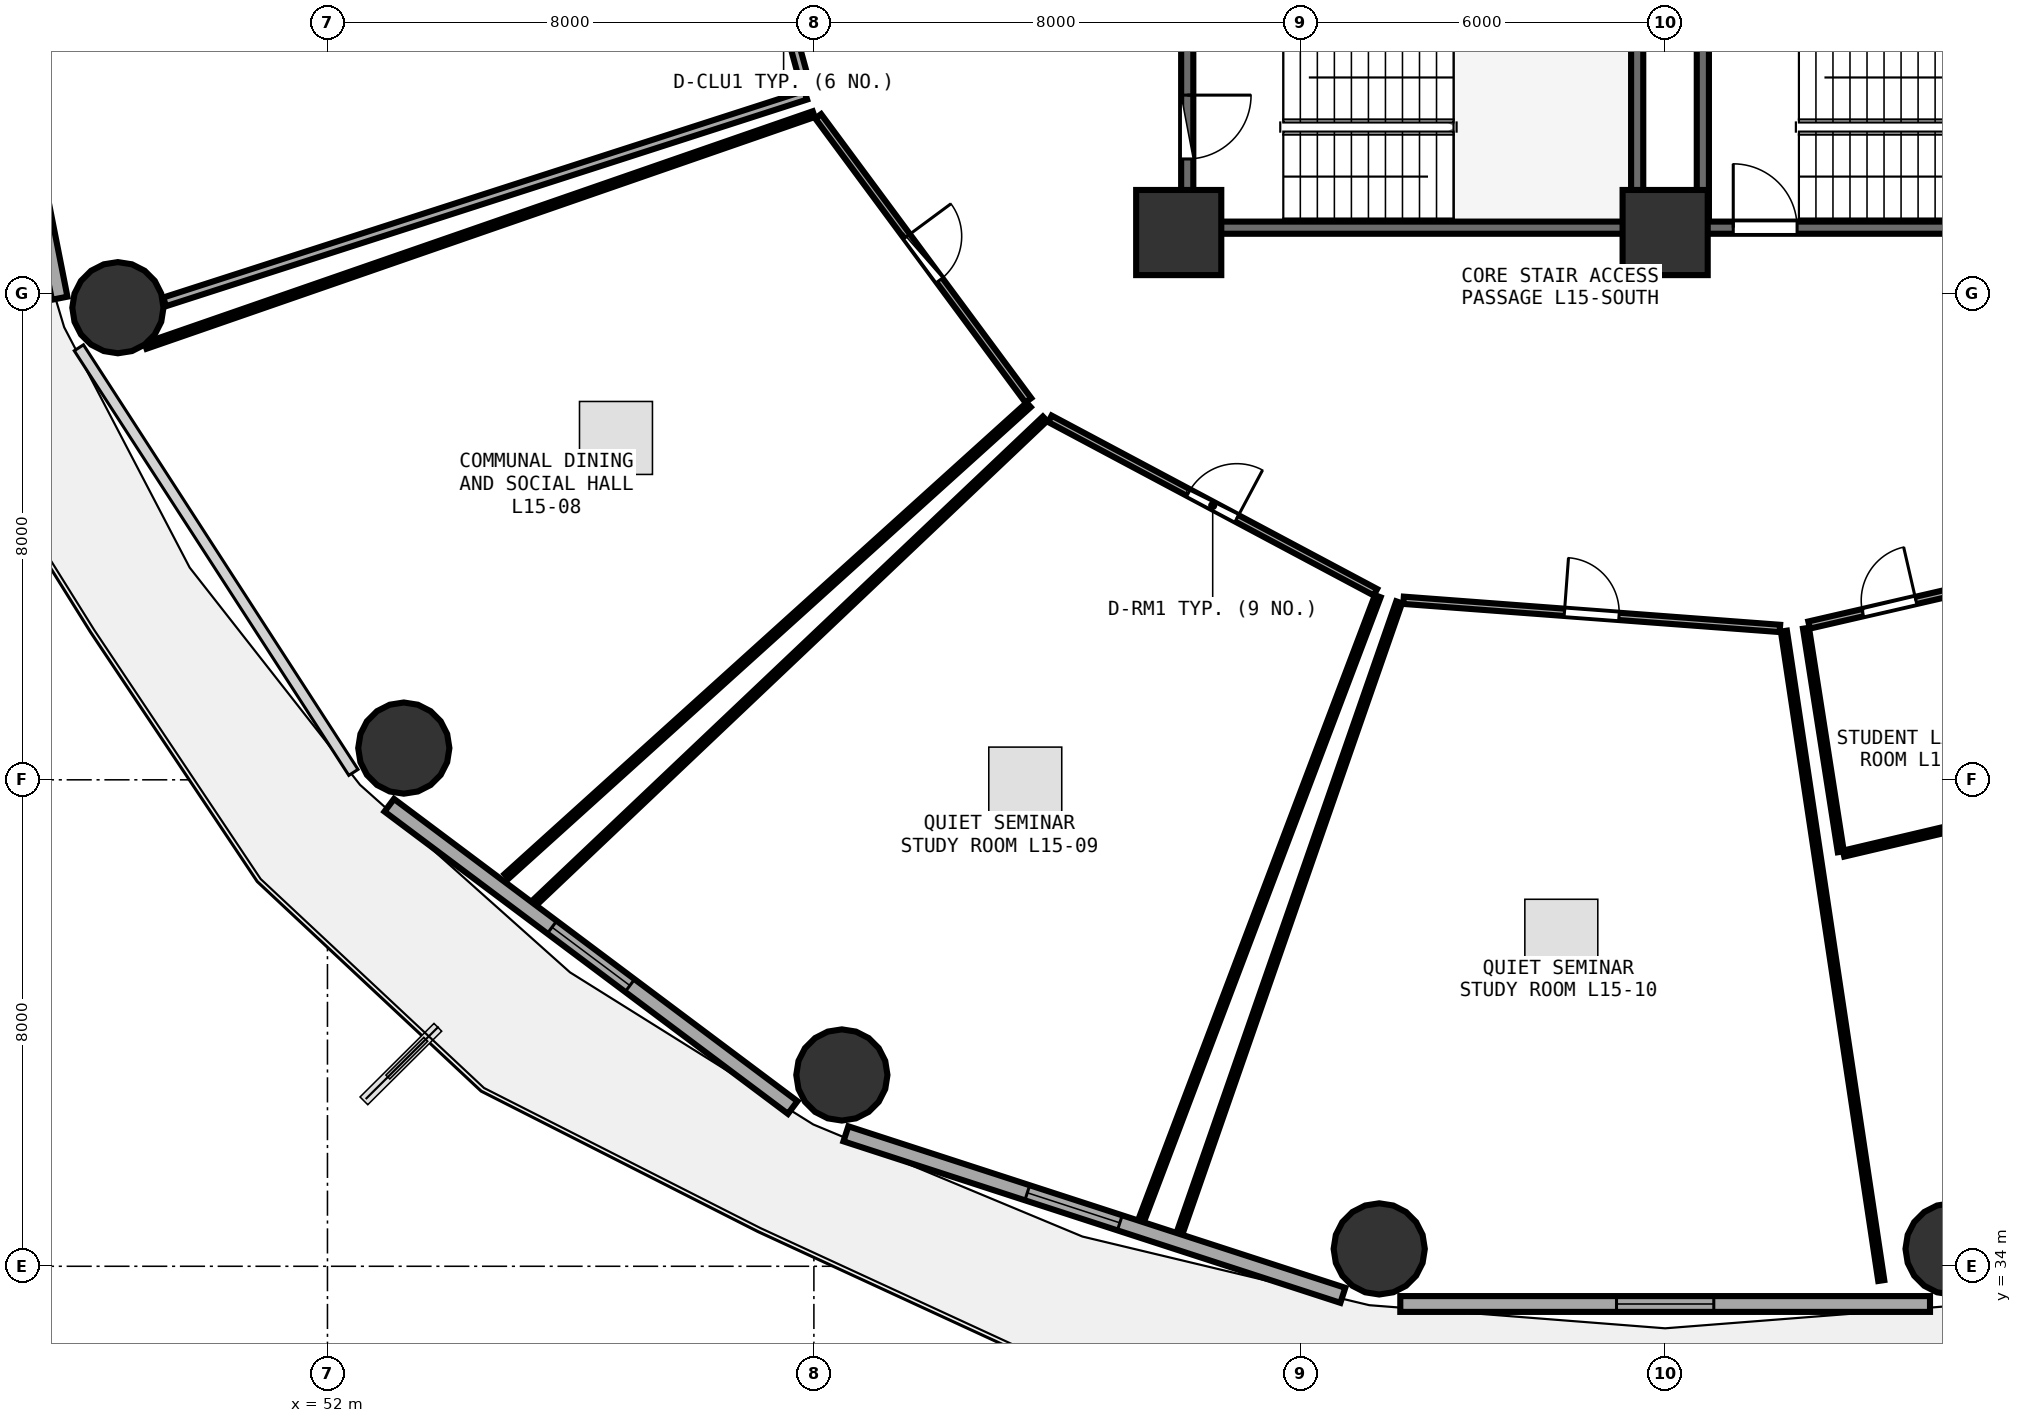
"""IFC4 building model, lengths in metres.
Left out: names, types, materials, properties, quantities, classifications, styles, units other than length and angle.
Written with IfcOpenShell. Run it as: python <this file> out.ifc"""

import sys

from ifc_helpers import new_model, si_unit, direction, frame, frame_2d, origin, origin_2d, place, context, subcontext, project, spatial, rectangle, circle, extrude, element, fill, save


model = new_model("IFC4")
c1 = context("Model", 3, precision=1e-05, world=origin(), true_north=direction((0.0, 1.0)))
c2 = subcontext(c1, "Body", "Model", "MODEL_VIEW")
j1 = project(units=[si_unit("LENGTHUNIT", "METRE"), si_unit("PLANEANGLEUNIT", "RADIAN")], contexts=[c1])
p1 = place(None, origin())
s1 = spatial("IfcSite", under=j1, at=p1, CompositionType="ELEMENT")
p2 = place(p1, origin())
s2 = spatial("IfcBuilding", under=s1, at=p2, CompositionType="ELEMENT")
p3 = place(p2, frame((0.0, 0.0, 60.0)))
s3 = spatial("IfcBuildingStorey", under=s2, at=p3, CompositionType="ELEMENT", Elevation=60.0)
for number, where, z_axis, x_axis in (
    (1, (66.0, 51.0, 0.0), (0.0, 0.0, 1.0), (1.0, 0.0, 0.0)),
    (2, (74.0, 51.0, 0.0), (0.0, 0.0, 1.0), (1.0, 0.0, 0.0)),
):
    element("IfcColumn", number, at=place(p3, frame(where, z_axis=z_axis, x_axis=x_axis)), inside=s3, PredefinedType="PILASTER", context=c2, shape_type="SweptSolid", body=[
        extrude(rectangle(XDim=1.4, YDim=1.4, at=origin_2d()), origin(), (0.0, 0.0, 1.0), 3.75),
    ])
for number, where, z_axis, x_axis in (
    (3, (48.553, 49.764, 0.0), (0.0, 0.0, 1.0), (1.0, 0.0, 0.0)),
    (4, (53.256, 42.522, 0.0), (0.0, 0.0, 1.0), (1.0, 0.0, 0.0)),
    (5, (60.46, 37.146, 0.0), (0.0, 0.0, 1.0), (1.0, 0.0, 0.0)),
    (6, (69.298, 34.286, 0.0), (0.0, 0.0, 1.0), (1.0, 0.0, 0.0)),
    (7, (78.702, 34.286, 0.0), (0.0, 0.0, 1.0), (1.0, 0.0, 0.0)),
):
    element("IfcColumn", number, at=place(p3, frame(where, z_axis=z_axis, x_axis=x_axis)), inside=s3, PredefinedType="COLUMN", context=c2, shape_type="SweptSolid", body=[
        extrude(circle(Radius=0.75, at=origin_2d()), origin(), (0.0, 0.0, 1.0), 3.75),
    ])
p4 = place(p3, frame((46.104, 57.477, 0.0), z_axis=(0.0, 0.0, 1.0), x_axis=(0.193726159581, -0.98105564322, 0.0)))
e8 = element("IfcWall", 8, at=p4, inside=s3, PredefinedType="SOLIDWALL", context=c2, shape_type="SweptSolid", body=[
    extrude(rectangle(XDim=7.703, YDim=0.26, at=frame_2d((3.851, 0.0))), origin(), (0.0, 0.0, 1.0), 3.475),
])
p5 = place(p4, frame((3.051, 0.0, 0.85)))
e9 = element("IfcOpeningElement", 9, at=p5, cuts=e8, PredefinedType="OPENING", context=c2, shape_type="SweptSolid", body=[
    extrude(rectangle(XDim=1.6, YDim=1.45, at=frame_2d((0.8, 0.725))), frame((0.0, 0.14, 0.0), z_axis=(0.0, -1.0, 0.0), x_axis=(1.0, 0.0, 0.0)), (0.0, 0.0, 1.0), 0.28),
])
p6 = place(p3, frame((53.016, 41.582, 0.0), z_axis=(0.0, 0.0, 1.0), x_axis=(0.80030733173, -0.599590005569, 0.0)))
e10 = element("IfcWall", 10, at=p6, inside=s3, PredefinedType="SOLIDWALL", context=c2, shape_type="SweptSolid", body=[
    extrude(rectangle(XDim=8.291, YDim=0.26, at=frame_2d((4.145, 0.0))), origin(), (0.0, 0.0, 1.0), 3.475),
])
p7 = place(p6, frame((3.345, 0.0, 0.85)))
e11 = element("IfcOpeningElement", 11, at=p7, cuts=e10, PredefinedType="OPENING", context=c2, shape_type="SweptSolid", body=[
    extrude(rectangle(XDim=1.6, YDim=1.45, at=frame_2d((0.8, 0.725))), frame((0.0, 0.14, 0.0), z_axis=(0.0, -1.0, 0.0), x_axis=(1.0, 0.0, 0.0)), (0.0, 0.0, 1.0), 0.28),
])
p8 = place(p3, frame((60.526, 36.178, 0.0), z_axis=(0.0, 0.0, 1.0), x_axis=(0.951039914291, -0.309068085421, 0.0)))
e12 = element("IfcWall", 12, at=p8, inside=s3, PredefinedType="SOLIDWALL", context=c2, shape_type="SweptSolid", body=[
    extrude(rectangle(XDim=8.594, YDim=0.26, at=frame_2d((4.297, 0.0))), origin(), (0.0, 0.0, 1.0), 3.475),
])
p9 = place(p8, frame((3.137, 0.0, 0.85)))
e13 = element("IfcOpeningElement", 13, at=p9, cuts=e12, PredefinedType="OPENING", context=c2, shape_type="SweptSolid", body=[
    extrude(rectangle(XDim=1.6, YDim=1.45, at=frame_2d((0.8, 0.725))), frame((0.0, 0.14, 0.0), z_axis=(0.0, -1.0, 0.0), x_axis=(1.0, 0.0, 0.0)), (0.0, 0.0, 1.0), 0.28),
])
p10 = place(p3, frame((69.644, 33.38, 0.0), z_axis=(0.0, 0.0, 1.0), x_axis=(1.0, 0.0, 0.0)))
e14 = element("IfcWall", 14, at=p10, inside=s3, PredefinedType="SOLIDWALL", context=c2, shape_type="SweptSolid", body=[
    extrude(rectangle(XDim=8.712, YDim=0.26, at=frame_2d((4.356, 0.0))), origin(), (0.0, 0.0, 1.0), 3.475),
])
p11 = place(p10, frame((3.556, 0.0, 0.85)))
e15 = element("IfcOpeningElement", 15, at=p11, cuts=e14, PredefinedType="OPENING", context=c2, shape_type="SweptSolid", body=[
    extrude(rectangle(XDim=1.6, YDim=1.45, at=frame_2d((0.8, 0.725))), frame((0.0, 0.14, 0.0), z_axis=(0.0, -1.0, 0.0), x_axis=(1.0, 0.0, 0.0)), (0.0, 0.0, 1.0), 0.28),
])
p12 = place(p3, frame((74.0, 51.08, 0.0), z_axis=(0.0, 0.0, 1.0), x_axis=(1.0, 0.0, 0.0)))
e16 = element("IfcWall", 16, at=p12, inside=s3, PredefinedType="SHEAR", context=c2, shape_type="SweptSolid", body=[
    extrude(rectangle(XDim=7.9, YDim=0.2, at=frame_2d((3.95, 0.0))), origin(), (0.0, 0.0, 1.0), 3.49),
])
p13 = place(p12, frame((1.12, 0.0, 0.0)))
e17 = element("IfcOpeningElement", 17, at=p13, cuts=e16, PredefinedType="OPENING", context=c2, shape_type="SweptSolid", body=[
    extrude(rectangle(XDim=1.05, YDim=2.1, at=frame_2d((0.525, 1.05))), frame((0.0, 0.11, 0.0), z_axis=(0.0, -1.0, 0.0), x_axis=(1.0, 0.0, 0.0)), (0.0, 0.0, 1.0), 0.22),
])
p14 = place(p3, frame((74.62, 54.27, 0.0), z_axis=(0.0, 0.0, 1.0), x_axis=(0.0, -1.0, 0.0)))
e18 = element("IfcWall", 18, at=p14, inside=s3, PredefinedType="SHEAR", context=c2, shape_type="SweptSolid", body=[
    extrude(rectangle(XDim=3.07, YDim=0.2, at=frame_2d((1.535, 0.0))), origin(), (0.0, 0.0, 1.0), 3.49),
])
p15 = place(p3, frame((66.26, 51.08, 0.0), z_axis=(0.0, 0.0, 1.0), x_axis=(1.0, 0.0, 0.0)))
e19 = element("IfcWall", 19, at=p15, inside=s3, PredefinedType="SHEAR", context=c2, shape_type="SweptSolid", body=[
    extrude(rectangle(XDim=7.16, YDim=0.2, at=frame_2d((3.58, 0.0))), origin(), (0.0, 0.0, 1.0), 3.49),
])
p16 = place(p3, frame((73.54, 51.2, 0.0), z_axis=(0.0, 0.0, 1.0), x_axis=(0.0, 1.0, 0.0)))
e20 = element("IfcWall", 20, at=p16, inside=s3, PredefinedType="SHEAR", context=c2, shape_type="SweptSolid", body=[
    extrude(rectangle(XDim=3.07, YDim=0.2, at=frame_2d((1.535, 0.0))), origin(), (0.0, 0.0, 1.0), 3.49),
])
p17 = place(p3, frame((66.14, 54.27, 0.0), z_axis=(0.0, 0.0, 1.0), x_axis=(0.0, -1.0, 0.0)))
e21 = element("IfcWall", 21, at=p17, inside=s3, PredefinedType="SHEAR", context=c2, shape_type="SweptSolid", body=[
    extrude(rectangle(XDim=3.07, YDim=0.2, at=frame_2d((1.535, 0.0))), origin(), (0.0, 0.0, 1.0), 3.49),
])
p18 = place(p17, frame((1.01, 0.0, 0.0)))
e22 = element("IfcOpeningElement", 22, at=p18, cuts=e21, PredefinedType="OPENING", context=c2, shape_type="SweptSolid", body=[
    extrude(rectangle(XDim=1.05, YDim=2.1, at=frame_2d((0.525, 1.05))), frame((0.0, 0.11, 0.0), z_axis=(0.0, -1.0, 0.0), x_axis=(1.0, 0.0, 0.0)), (0.0, 0.0, 1.0), 0.22),
])
p19 = place(p3, frame((59.116, 56.155, 0.0), z_axis=(0.0, 0.0, 1.0), x_axis=(0.263653235341, -0.964617526014, 0.0)))
e23 = element("IfcWall", 23, at=p19, inside=s3, PredefinedType="PARTITIONING", context=c2, shape_type="SweptSolid", body=[
    extrude(rectangle(XDim=2.93, YDim=0.15, at=frame_2d((1.465, 0.0))), origin(), (0.0, 0.0, 1.0), 3.48),
])
p20 = place(p19, frame((0.99, 0.0, 0.0)))
e24 = element("IfcOpeningElement", 24, at=p20, cuts=e23, PredefinedType="OPENING", context=c2, shape_type="SweptSolid", body=[
    extrude(rectangle(XDim=0.95, YDim=2.08, at=frame_2d((0.475, 1.04))), frame((0.0, 0.085, 0.0), z_axis=(0.0, -1.0, 0.0), x_axis=(1.0, 0.0, 0.0)), (0.0, 0.0, 1.0), 0.17),
])
p21 = place(p3, frame((60.071, 52.912, 0.0), z_axis=(0.0, 0.0, 1.0), x_axis=(0.594763174801, -0.80390096772, 0.0)))
e25 = element("IfcWall", 25, at=p21, inside=s3, PredefinedType="PARTITIONING", context=c2, shape_type="SweptSolid", body=[
    extrude(rectangle(XDim=5.81, YDim=0.12, at=frame_2d((2.905, 0.0))), origin(), (0.0, 0.0, 1.0), 2.875),
])
p22 = place(p21, frame((2.455, 0.0, 0.0)))
e26 = element("IfcOpeningElement", 26, at=p22, cuts=e25, PredefinedType="OPENING", context=c2, shape_type="SweptSolid", body=[
    extrude(rectangle(XDim=0.9, YDim=2.08, at=frame_2d((0.45, 1.04))), frame((0.0, 0.07, 0.0), z_axis=(0.0, -1.0, 0.0), x_axis=(1.0, 0.0, 0.0)), (0.0, 0.0, 1.0), 0.14),
])
p23 = place(p3, frame((63.882, 47.937, 0.0), z_axis=(0.0, 0.0, 1.0), x_axis=(0.882584601599, -0.470153614279, 0.0)))
e27 = element("IfcWall", 27, at=p23, inside=s3, PredefinedType="PARTITIONING", context=c2, shape_type="SweptSolid", body=[
    extrude(rectangle(XDim=6.065, YDim=0.12, at=frame_2d((3.033, 0.0))), origin(), (0.0, 0.0, 1.0), 2.875),
])
p24 = place(p23, frame((2.583, 0.0, 0.0)))
e28 = element("IfcOpeningElement", 28, at=p24, cuts=e27, PredefinedType="OPENING", context=c2, shape_type="SweptSolid", body=[
    extrude(rectangle(XDim=0.9, YDim=2.08, at=frame_2d((0.45, 1.04))), frame((0.0, 0.07, 0.0), z_axis=(0.0, -1.0, 0.0), x_axis=(1.0, 0.0, 0.0)), (0.0, 0.0, 1.0), 0.14),
])
p25 = place(p3, frame((69.698, 44.952, 0.0), z_axis=(0.0, 0.0, 1.0), x_axis=(0.997215128993, -0.074578726908, 0.0)))
e29 = element("IfcWall", 29, at=p25, inside=s3, PredefinedType="PARTITIONING", context=c2, shape_type="SweptSolid", body=[
    extrude(rectangle(XDim=6.207, YDim=0.12, at=frame_2d((3.104, 0.0))), origin(), (0.0, 0.0, 1.0), 3.235),
])
p26 = place(p25, frame((2.653, 0.0, 0.0)))
e30 = element("IfcOpeningElement", 30, at=p26, cuts=e29, PredefinedType="OPENING", context=c2, shape_type="SweptSolid", body=[
    extrude(rectangle(XDim=0.9, YDim=2.08, at=frame_2d((0.45, 1.04))), frame((0.0, 0.07, 0.0), z_axis=(0.0, -1.0, 0.0), x_axis=(1.0, 0.0, 0.0)), (0.0, 0.0, 1.0), 0.14),
])
p27 = place(p3, frame((76.368, 44.545, 0.0), z_axis=(0.0, 0.0, 1.0), x_axis=(0.974445966729, 0.224622033484, 0.0)))
e31 = element("IfcWall", 31, at=p27, inside=s3, PredefinedType="PARTITIONING", context=c2, shape_type="SweptSolid", body=[
    extrude(rectangle(XDim=2.703, YDim=0.12, at=frame_2d((1.352, 0.0))), origin(), (0.0, 0.0, 1.0), 3.235),
])
p28 = place(p27, frame((0.902, 0.0, 0.0)))
e32 = element("IfcOpeningElement", 32, at=p28, cuts=e31, PredefinedType="OPENING", context=c2, shape_type="SweptSolid", body=[
    extrude(rectangle(XDim=0.9, YDim=2.08, at=frame_2d((0.45, 1.04))), frame((0.0, 0.07, 0.0), z_axis=(0.0, -1.0, 0.0), x_axis=(1.0, 0.0, 0.0)), (0.0, 0.0, 1.0), 0.14),
])
p29 = place(p3, frame((59.866, 53.259, 0.0), z_axis=(0.0, 0.0, 1.0), x_axis=(-0.951774856366, -0.30679736438, 0.0)))
e33 = element("IfcWall", 33, at=p29, inside=s3, PredefinedType="PARTITIONING", context=c2, shape_type="SweptSolid", body=[
    extrude(rectangle(XDim=11.078, YDim=0.15, at=frame_2d((5.539, 0.0))), origin(), (0.0, 0.0, 1.0), 2.875),
])
p30 = place(p3, frame((63.532, 48.166, 0.0), z_axis=(0.0, 0.0, 1.0), x_axis=(-0.742191353367, -0.670188029577, 0.0)))
e34 = element("IfcWall", 34, at=p30, inside=s3, PredefinedType="PARTITIONING", context=c2, shape_type="SweptSolid", body=[
    extrude(rectangle(XDim=11.569, YDim=0.1, at=frame_2d((5.785, 0.0))), origin(), (0.0, 0.0, 1.0), 2.875),
])
p31 = place(p3, frame((49.008, 49.136, 0.0), z_axis=(0.0, 0.0, 1.0), x_axis=(0.944815756918, 0.327602175634, 0.0)))
e35 = element("IfcWall", 35, at=p31, inside=s3, PredefinedType="PARTITIONING", context=c2, shape_type="SweptSolid", body=[
    extrude(rectangle(XDim=11.632, YDim=0.1, at=frame_2d((5.816, 0.0))), origin(), (0.0, 0.0, 1.0), 2.875),
])
p32 = place(p3, frame((69.274, 45.02, 0.0), z_axis=(0.0, 0.0, 1.0), x_axis=(-0.354325845477, -0.935122021571, 0.0)))
e36 = element("IfcWall", 36, at=p32, inside=s3, PredefinedType="PARTITIONING", context=c2, shape_type="SweptSolid", body=[
    extrude(rectangle(XDim=10.938, YDim=0.1, at=frame_2d((5.469, 0.0))), origin(), (0.0, 0.0, 1.0), 2.875),
])
p33 = place(p3, frame((55.433, 40.003, 0.0), z_axis=(0.0, 0.0, 1.0), x_axis=(0.725627678847, 0.688087546531, 0.0)))
e37 = element("IfcWall", 37, at=p33, inside=s3, PredefinedType="PARTITIONING", context=c2, shape_type="SweptSolid", body=[
    extrude(rectangle(XDim=11.531, YDim=0.1, at=frame_2d((5.765, 0.0))), origin(), (0.0, 0.0, 1.0), 2.875),
])
p34 = place(p3, frame((75.953, 44.445, 0.0), z_axis=(0.0, 0.0, 1.0), x_axis=(0.148282966471, -0.988944974129, 0.0)))
e38 = element("IfcWall", 38, at=p34, inside=s3, PredefinedType="PARTITIONING", context=c2, shape_type="SweptSolid", body=[
    extrude(rectangle(XDim=10.799, YDim=0.1, at=frame_2d((5.399, 0.0))), origin(), (0.0, 0.0, 1.0), 2.875),
])
p35 = place(p3, frame((66.038, 34.612, 0.0), z_axis=(0.0, 0.0, 1.0), x_axis=(0.328662915274, 0.944447292401, 0.0)))
e39 = element("IfcWall", 39, at=p35, inside=s3, PredefinedType="PARTITIONING", context=c2, shape_type="SweptSolid", body=[
    extrude(rectangle(XDim=10.914, YDim=0.1, at=frame_2d((5.457, 0.0))), origin(), (0.0, 0.0, 1.0), 2.875),
])
p36 = place(p3, frame((80.302, 41.579, 0.0), z_axis=(0.0, 0.0, 1.0), x_axis=(-0.973403286496, -0.229098323518, 0.0)))
e40 = element("IfcWall", 40, at=p36, inside=s3, PredefinedType="PARTITIONING", context=c2, shape_type="SweptSolid", body=[
    extrude(rectangle(XDim=3.46, YDim=0.1, at=frame_2d((1.73, 0.0))), origin(), (0.0, 0.0, 1.0), 2.875),
])
p37 = place(p3, frame((76.889, 40.816, 0.0), z_axis=(0.0, 0.0, 1.0), x_axis=(-0.153950475789, 0.988078565198, 0.0)))
e41 = element("IfcWall", 41, at=p37, inside=s3, PredefinedType="PARTITIONING", context=c2, shape_type="SweptSolid", body=[
    extrude(rectangle(XDim=3.72, YDim=0.1, at=frame_2d((1.86, 0.0))), origin(), (0.0, 0.0, 1.0), 3.175),
])
p38 = place(p7, origin())
e42 = element("IfcWindow", 42, at=p38, inside=s3, PartitioningType="SINGLE_PANEL", PredefinedType="WINDOW", context=c2, shape_type="SweptSolid", body=[
    extrude(rectangle(XDim=1.6, YDim=1.45, at=frame_2d((0.8, 0.725))), frame((0.0, 0.03, 0.0), z_axis=(0.0, -1.0, 0.0), x_axis=(1.0, 0.0, 0.0)), (0.0, 0.0, 1.0), 0.06),
])
fill(e11, e42)
p39 = place(p9, origin())
e43 = element("IfcWindow", 43, at=p39, inside=s3, PartitioningType="SINGLE_PANEL", PredefinedType="WINDOW", context=c2, shape_type="SweptSolid", body=[
    extrude(rectangle(XDim=1.6, YDim=1.45, at=frame_2d((0.8, 0.725))), frame((0.0, 0.03, 0.0), z_axis=(0.0, -1.0, 0.0), x_axis=(1.0, 0.0, 0.0)), (0.0, 0.0, 1.0), 0.06),
])
fill(e13, e43)
p40 = place(p11, origin())
e44 = element("IfcWindow", 44, at=p40, inside=s3, PartitioningType="SINGLE_PANEL", PredefinedType="WINDOW", context=c2, shape_type="SweptSolid", body=[
    extrude(rectangle(XDim=1.6, YDim=1.45, at=frame_2d((0.8, 0.725))), frame((0.0, 0.03, 0.0), z_axis=(0.0, -1.0, 0.0), x_axis=(1.0, 0.0, 0.0)), (0.0, 0.0, 1.0), 0.06),
])
fill(e15, e44)
p41 = place(p13, origin())
e45 = element("IfcDoor", 45, at=p41, inside=s3, OperationType="SINGLE_SWING_LEFT", PredefinedType="DOOR", context=c2, shape_type="SweptSolid", body=[
    extrude(rectangle(XDim=1.05, YDim=2.1, at=frame_2d((0.525, 1.05))), frame((0.0, 0.025, 0.0), z_axis=(0.0, -1.0, 0.0), x_axis=(1.0, 0.0, 0.0)), (0.0, 0.0, 1.0), 0.05),
])
fill(e17, e45)
p42 = place(p18, origin())
e46 = element("IfcDoor", 46, at=p42, inside=s3, OperationType="SINGLE_SWING_LEFT", PredefinedType="DOOR", context=c2, shape_type="SweptSolid", body=[
    extrude(rectangle(XDim=1.05, YDim=2.1, at=frame_2d((0.525, 1.05))), frame((0.0, 0.025, 0.0), z_axis=(0.0, -1.0, 0.0), x_axis=(1.0, 0.0, 0.0)), (0.0, 0.0, 1.0), 0.05),
])
fill(e22, e46)
p43 = place(p22, origin())
e47 = element("IfcDoor", 47, at=p43, inside=s3, OperationType="SINGLE_SWING_LEFT", PredefinedType="DOOR", context=c2, shape_type="SweptSolid", body=[
    extrude(rectangle(XDim=0.9, YDim=2.08, at=frame_2d((0.45, 1.04))), frame((0.0, 0.025, 0.0), z_axis=(0.0, -1.0, 0.0), x_axis=(1.0, 0.0, 0.0)), (0.0, 0.0, 1.0), 0.05),
])
fill(e26, e47)
p44 = place(p24, origin())
e48 = element("IfcDoor", 48, at=p44, inside=s3, OperationType="SINGLE_SWING_RIGHT", PredefinedType="DOOR", context=c2, shape_type="SweptSolid", body=[
    extrude(rectangle(XDim=0.9, YDim=2.08, at=frame_2d((0.45, 1.04))), frame((0.0, 0.025, 0.0), z_axis=(0.0, -1.0, 0.0), x_axis=(1.0, 0.0, 0.0)), (0.0, 0.0, 1.0), 0.05),
])
fill(e28, e48)
p45 = place(p26, origin())
e49 = element("IfcDoor", 49, at=p45, inside=s3, OperationType="SINGLE_SWING_LEFT", PredefinedType="DOOR", context=c2, shape_type="SweptSolid", body=[
    extrude(rectangle(XDim=0.9, YDim=2.08, at=frame_2d((0.45, 1.04))), frame((0.0, 0.025, 0.0), z_axis=(0.0, -1.0, 0.0), x_axis=(1.0, 0.0, 0.0)), (0.0, 0.0, 1.0), 0.05),
])
fill(e30, e49)
p46 = place(p28, origin())
e50 = element("IfcDoor", 50, at=p46, inside=s3, OperationType="SINGLE_SWING_RIGHT", PredefinedType="DOOR", context=c2, shape_type="SweptSolid", body=[
    extrude(rectangle(XDim=0.9, YDim=2.08, at=frame_2d((0.45, 1.04))), frame((0.0, 0.025, 0.0), z_axis=(0.0, -1.0, 0.0), x_axis=(1.0, 0.0, 0.0)), (0.0, 0.0, 1.0), 0.05),
])
fill(e32, e50)
save(model, sys.argv[1])
